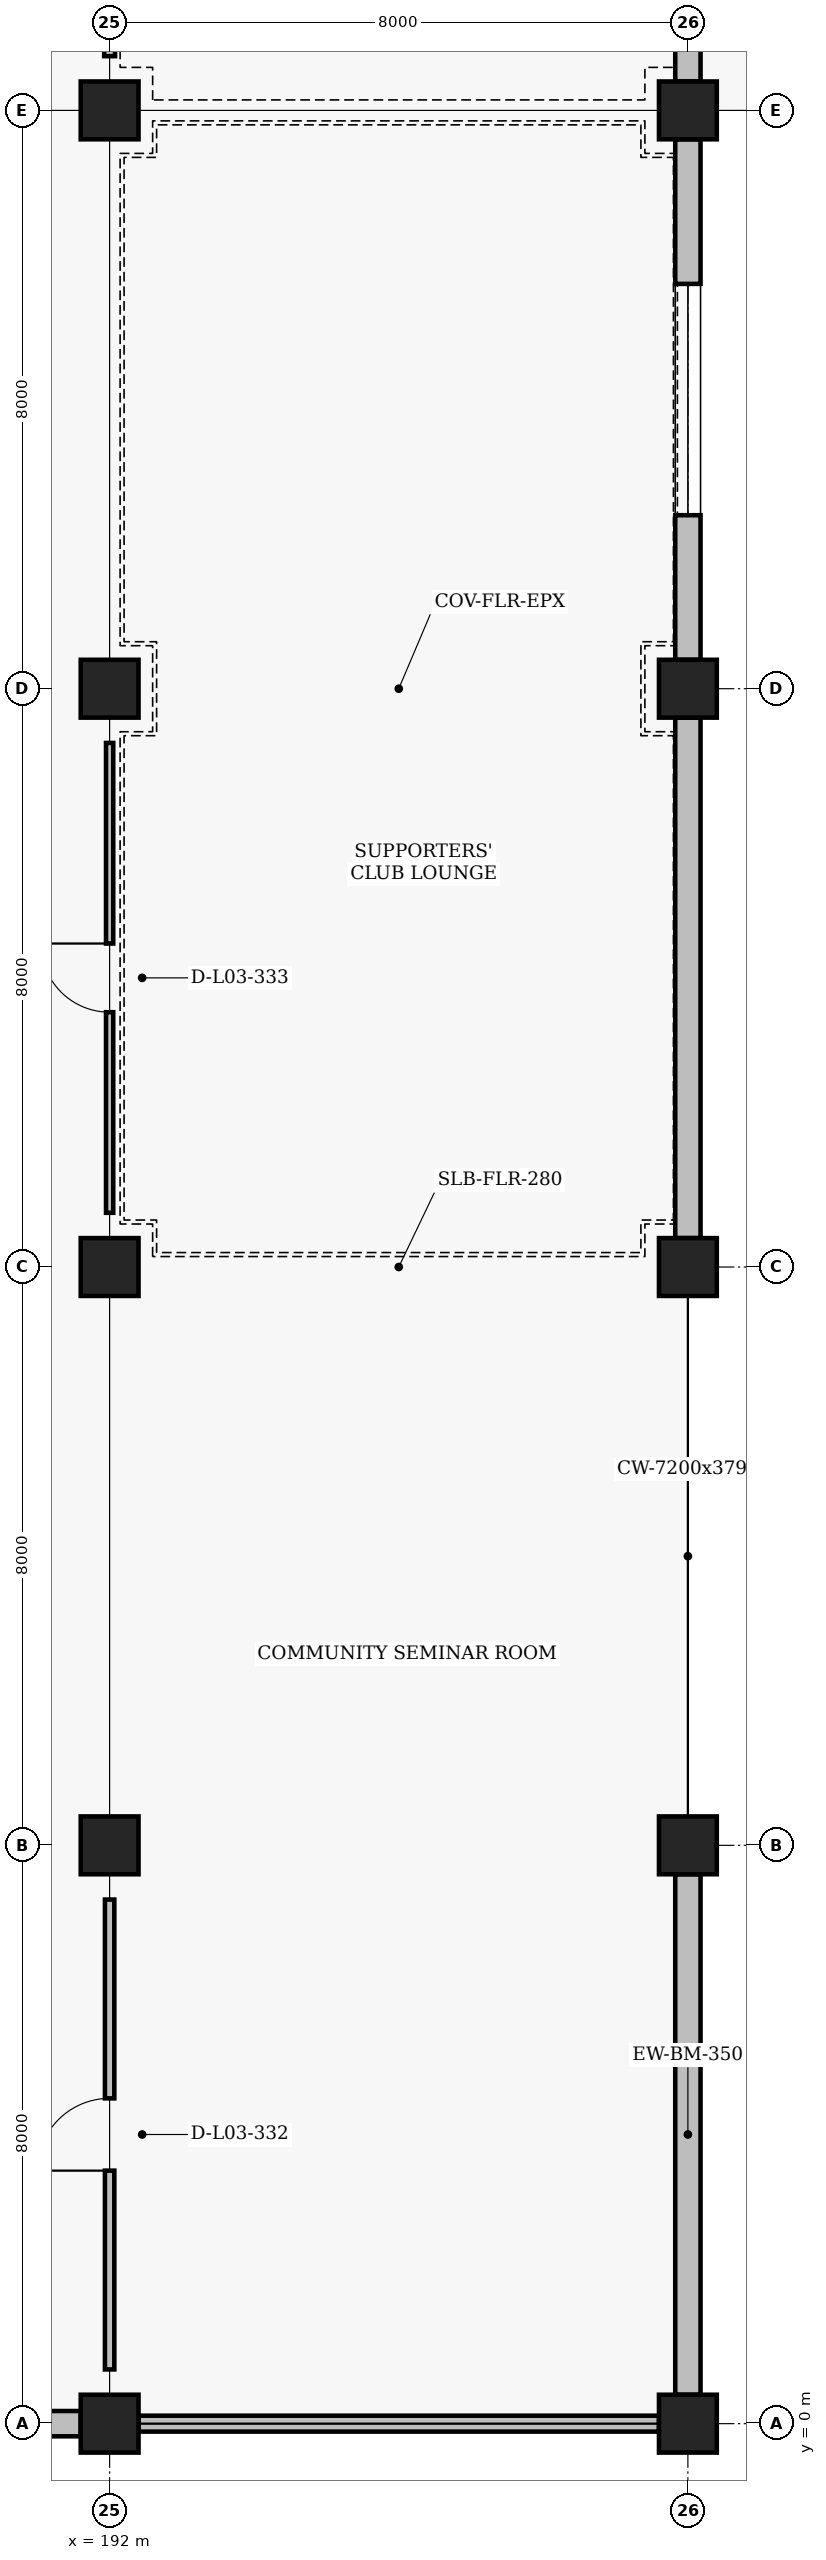
"""IFC4 building model, lengths in metres.
Left out: names, types, materials, properties, quantities, classifications, styles, units other than length and angle.
Written with IfcOpenShell. Run it as: python <this file> out.ifc"""

import sys

from ifc_helpers import new_model, si_unit, direction, frame, frame_2d, origin, origin_2d, place, context, subcontext, project, spatial, rectangle, extrude, element, fill, save


model = new_model("IFC4")
c1 = context("Model", 3, precision=1e-05, world=origin(), true_north=direction((0.0, 1.0)))
c2 = subcontext(c1, "Body", "Model", "MODEL_VIEW")
j1 = project(units=[si_unit("LENGTHUNIT", "METRE"), si_unit("PLANEANGLEUNIT", "RADIAN")], contexts=[c1])
p1 = place(None, origin())
s1 = spatial("IfcSite", under=j1, at=p1, CompositionType="ELEMENT")
p2 = place(p1, origin())
s2 = spatial("IfcBuilding", under=s1, at=p2, CompositionType="ELEMENT")
p3 = place(p2, frame((0.0, 0.0, 9.6)))
s3 = spatial("IfcBuildingStorey", under=s2, at=p3, CompositionType="ELEMENT", Elevation=9.6)
for number, where, z_axis, x_axis in (
    (1, (192.0, 0.0, 0.0), (0.0, 0.0, 1.0), (1.0, 0.0, 0.0)),
    (2, (192.0, 8.0, 0.0), (0.0, 0.0, 1.0), (1.0, 0.0, 0.0)),
    (3, (192.0, 16.0, 0.0), (0.0, 0.0, 1.0), (1.0, 0.0, 0.0)),
    (4, (192.0, 24.0, 0.0), (0.0, 0.0, 1.0), (1.0, 0.0, 0.0)),
    (5, (192.0, 32.0, 0.0), (0.0, 0.0, 1.0), (1.0, 0.0, 0.0)),
    (6, (200.0, 0.0, 0.0), (0.0, 0.0, 1.0), (1.0, 0.0, 0.0)),
    (7, (200.0, 8.0, 0.0), (0.0, 0.0, 1.0), (1.0, 0.0, 0.0)),
    (8, (200.0, 16.0, 0.0), (0.0, 0.0, 1.0), (1.0, 0.0, 0.0)),
    (9, (200.0, 24.0, 0.0), (0.0, 0.0, 1.0), (1.0, 0.0, 0.0)),
    (10, (200.0, 32.0, 0.0), (0.0, 0.0, 1.0), (1.0, 0.0, 0.0)),
):
    element("IfcColumn", number, at=place(p3, frame(where, z_axis=z_axis, x_axis=x_axis)), inside=s3, PredefinedType="COLUMN", context=c2, shape_type="SweptSolid", body=[
        extrude(rectangle(XDim=0.8, YDim=0.8, at=origin_2d()), origin(), (0.0, 0.0, 1.0), 4.8),
    ])
p4 = place(p3, frame((184.4, 0.0, 0.0), z_axis=(0.0, 0.0, 1.0), x_axis=(1.0, 0.0, 0.0)))
e11 = element("IfcWall", 11, at=p4, inside=s3, PredefinedType="SOLIDWALL", context=c2, shape_type="SweptSolid", body=[
    extrude(rectangle(XDim=7.2, YDim=0.35, at=frame_2d((3.6, 0.0))), origin(), (0.0, 0.0, 1.0), 3.79),
])
p5 = place(p3, frame((192.4, 0.0, 0.0), z_axis=(0.0, 0.0, 1.0), x_axis=(1.0, 0.0, 0.0)))
e12 = element("IfcWall", 12, at=p5, inside=s3, PredefinedType="PARAPET", context=c2, shape_type="SweptSolid", body=[
    extrude(rectangle(XDim=7.2, YDim=0.22, at=frame_2d((3.6, 0.0))), origin(), (0.0, 0.0, 1.0), 0.16),
])
for number, where, z_axis, x_axis in (
    (13, (200.0, 0.4, 0.0), (0.0, 0.0, 1.0), (0.0, 1.0, 0.0)),
    (14, (200.0, 16.4, 0.0), (0.0, 0.0, 1.0), (0.0, 1.0, 0.0)),
):
    element("IfcWall", number, at=place(p3, frame(where, z_axis=z_axis, x_axis=x_axis)), inside=s3, PredefinedType="SOLIDWALL", context=c2, shape_type="SweptSolid", body=[
        extrude(rectangle(XDim=7.2, YDim=0.35, at=frame_2d((3.6, 0.0))), origin(), (0.0, 0.0, 1.0), 3.79),
    ])
p6 = place(p3, frame((200.0, 24.4, 0.0), z_axis=(0.0, 0.0, 1.0), x_axis=(0.0, 1.0, 0.0)))
e15 = element("IfcWall", 15, at=p6, inside=s3, PredefinedType="SOLIDWALL", context=c2, shape_type="SweptSolid", body=[
    extrude(rectangle(XDim=7.2, YDim=0.35, at=frame_2d((3.6, 0.0))), origin(), (0.0, 0.0, 1.0), 3.79),
])
p7 = place(p6, frame((2.0, 0.0, 1.9)))
e16 = element("IfcOpeningElement", 16, at=p7, cuts=e15, PredefinedType="OPENING", context=c2, shape_type="SweptSolid", body=[
    extrude(rectangle(XDim=3.2, YDim=1.1, at=frame_2d((1.6, 0.55))), frame((0.0, 0.185, 0.0), z_axis=(0.0, -1.0, 0.0), x_axis=(1.0, 0.0, 0.0)), (0.0, 0.0, 1.0), 0.37),
])
p8 = place(p3, frame((200.0, 32.4, 0.0), z_axis=(0.0, 0.0, 1.0), x_axis=(0.0, 1.0, 0.0)))
e17 = element("IfcWall", 17, at=p8, inside=s3, PredefinedType="SOLIDWALL", context=c2, shape_type="SweptSolid", body=[
    extrude(rectangle(XDim=7.2, YDim=0.35, at=frame_2d((3.6, 0.0))), origin(), (0.0, 0.0, 1.0), 3.79),
])
p9 = place(p3, frame((192.0, 0.75, 0.0), z_axis=(0.0, 0.0, 1.0), x_axis=(0.0, 1.0, 0.0)))
e18 = element("IfcWall", 18, at=p9, inside=s3, PredefinedType="PARTITIONING", context=c2, shape_type="SweptSolid", body=[
    extrude(rectangle(XDim=6.5, YDim=0.13, at=frame_2d((3.25, 0.0))), origin(), (0.0, 0.0, 1.0), 3.79),
])
p10 = place(p9, frame((2.75, 0.0, 0.0)))
e19 = element("IfcOpeningElement", 19, at=p10, cuts=e18, PredefinedType="OPENING", context=c2, shape_type="SweptSolid", body=[
    extrude(rectangle(XDim=1.0, YDim=2.1, at=frame_2d((0.5, 1.05))), frame((0.0, 0.075, 0.0), z_axis=(0.0, -1.0, 0.0), x_axis=(1.0, 0.0, 0.0)), (0.0, 0.0, 1.0), 0.15),
])
p11 = place(p3, frame((192.0, 16.75, 0.0), z_axis=(0.0, 0.0, 1.0), x_axis=(0.0, 1.0, 0.0)))
e20 = element("IfcWall", 20, at=p11, inside=s3, PredefinedType="PARTITIONING", context=c2, shape_type="SweptSolid", body=[
    extrude(rectangle(XDim=6.5, YDim=0.1, at=frame_2d((3.25, 0.0))), origin(), (0.0, 0.0, 1.0), 3.79),
])
p12 = place(p11, frame((2.775, 0.0, 0.0)))
e21 = element("IfcOpeningElement", 21, at=p12, cuts=e20, PredefinedType="OPENING", context=c2, shape_type="SweptSolid", body=[
    extrude(rectangle(XDim=0.95, YDim=2.1, at=frame_2d((0.475, 1.05))), frame((0.0, 0.06, 0.0), z_axis=(0.0, -1.0, 0.0), x_axis=(1.0, 0.0, 0.0)), (0.0, 0.0, 1.0), 0.12),
])
p13 = place(p3, frame((192.0, 32.75, 0.0), z_axis=(0.0, 0.0, 1.0), x_axis=(0.0, 1.0, 0.0)))
e22 = element("IfcWall", 22, at=p13, inside=s3, PredefinedType="PARTITIONING", context=c2, shape_type="SweptSolid", body=[
    extrude(rectangle(XDim=6.5, YDim=0.15, at=frame_2d((3.25, 0.0))), origin(), (0.0, 0.0, 1.0), 3.79),
])
p14 = place(p13, frame((2.15, 0.0, 0.0)))
e23 = element("IfcOpeningElement", 23, at=p14, cuts=e22, PredefinedType="OPENING", context=c2, shape_type="SweptSolid", body=[
    extrude(rectangle(XDim=2.2, YDim=2.4, at=frame_2d((1.1, 1.2))), frame((0.0, 0.085, 0.0), z_axis=(0.0, -1.0, 0.0), x_axis=(1.0, 0.0, 0.0)), (0.0, 0.0, 1.0), 0.17),
])
p15 = place(p7, origin())
e24 = element("IfcWindow", 24, at=p15, inside=s3, PartitioningType="SINGLE_PANEL", PredefinedType="LIGHTDOME", context=c2, shape_type="SweptSolid", body=[
    extrude(rectangle(XDim=3.2, YDim=1.1, at=frame_2d((1.6, 0.55))), frame((0.0, 0.03, 0.0), z_axis=(0.0, -1.0, 0.0), x_axis=(1.0, 0.0, 0.0)), (0.0, 0.0, 1.0), 0.06),
])
fill(e16, e24)
p16 = place(p10, origin())
e25 = element("IfcDoor", 25, at=p16, inside=s3, OperationType="SINGLE_SWING_LEFT", PredefinedType="DOOR", context=c2, shape_type="SweptSolid", body=[
    extrude(rectangle(XDim=1.0, YDim=2.1, at=frame_2d((0.5, 1.05))), frame((0.0, 0.025, 0.0), z_axis=(0.0, -1.0, 0.0), x_axis=(1.0, 0.0, 0.0)), (0.0, 0.0, 1.0), 0.05),
])
fill(e19, e25)
p17 = place(p12, origin())
e26 = element("IfcDoor", 26, at=p17, inside=s3, OperationType="SINGLE_SWING_RIGHT", PredefinedType="DOOR", context=c2, shape_type="SweptSolid", body=[
    extrude(rectangle(XDim=0.95, YDim=2.1, at=frame_2d((0.475, 1.05))), frame((0.0, 0.025, 0.0), z_axis=(0.0, -1.0, 0.0), x_axis=(1.0, 0.0, 0.0)), (0.0, 0.0, 1.0), 0.05),
])
fill(e21, e26)
save(model, sys.argv[1])
